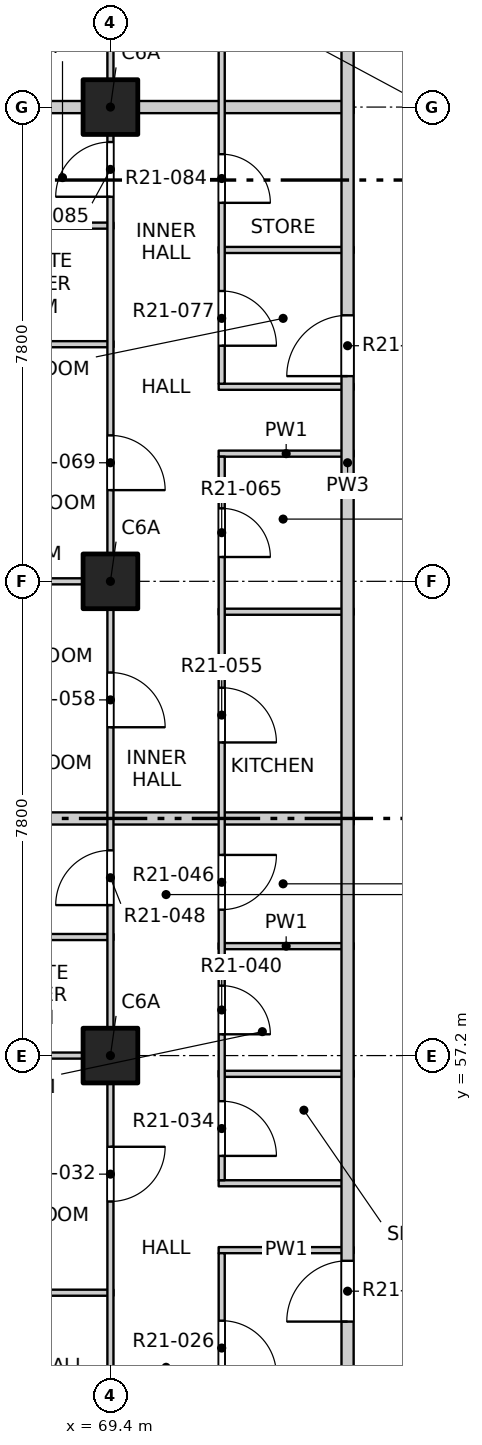
"""IFC4 building model, lengths in metres.
Left out: names, types, materials, properties, quantities, classifications, styles, units other than length and angle.
Written with IfcOpenShell. Run it as: python <this file> out.ifc"""

import sys

from ifc_helpers import new_model, si_unit, direction, frame, frame_2d, origin, origin_2d, place, context, subcontext, project, spatial, rectangle, extrude, element, fill, save


model = new_model("IFC4")
c1 = context("Model", 3, precision=1e-05, world=origin(), true_north=direction((0.0, 1.0)))
c2 = subcontext(c1, "Body", "Model", "MODEL_VIEW")
j1 = project(units=[si_unit("LENGTHUNIT", "METRE"), si_unit("PLANEANGLEUNIT", "RADIAN")], contexts=[c1])
p1 = place(None, origin())
s1 = spatial("IfcSite", under=j1, at=p1, CompositionType="ELEMENT")
p2 = place(p1, origin())
s2 = spatial("IfcBuilding", under=s1, at=p2, CompositionType="ELEMENT")
p3 = place(p2, frame((0.0, 0.0, 221.1)))
s3 = spatial("IfcBuildingStorey", under=s2, at=p3, CompositionType="ELEMENT", Elevation=221.1)
for number, where, z_axis, x_axis in (
    (1, (69.4, 57.2, -0.25), (0.0, 0.0, 1.0), (1.0, 0.0, 0.0)),
    (2, (69.4, 65.0, -0.25), (0.0, 0.0, 1.0), (1.0, 0.0, 0.0)),
    (3, (69.4, 72.8, -0.25), (0.0, 0.0, 1.0), (1.0, 0.0, 0.0)),
):
    element("IfcColumn", number, at=place(p3, frame(where, z_axis=z_axis, x_axis=x_axis)), inside=s3, PredefinedType="COLUMN", context=c2, shape_type="SweptSolid", body=[
        extrude(rectangle(XDim=0.9, YDim=0.9, at=origin_2d()), origin(), (0.0, 0.0, 1.0), 3.4),
    ])
p4 = place(p3, frame((61.9, 53.3, 0.0), z_axis=(0.0, 0.0, 1.0), x_axis=(1.0, 0.0, 0.0)))
e4 = element("IfcWall", 4, at=p4, inside=s3, PredefinedType="PARTITIONING", context=c2, shape_type="SweptSolid", body=[
    extrude(rectangle(XDim=7.55, YDim=0.1, at=frame_2d((3.775, 0.0))), origin(), (0.0, 0.0, 1.0), 3.15),
])
for number, where, z_axis, x_axis in (
    (5, (71.18, 54.0, 0.0), (0.0, 0.0, 1.0), (1.0, 0.0, 0.0)),
    (6, (71.18, 55.1, 0.0), (0.0, 0.0, 1.0), (1.0, 0.0, 0.0)),
    (7, (71.18, 56.9, 0.0), (0.0, 0.0, 1.0), (1.0, 0.0, 0.0)),
):
    element("IfcWall", number, at=place(p3, frame(where, z_axis=z_axis, x_axis=x_axis)), inside=s3, PredefinedType="PARTITIONING", context=c2, shape_type="SweptSolid", body=[
        extrude(rectangle(XDim=2.22, YDim=0.1, at=frame_2d((1.11, 0.0))), origin(), (0.0, 0.0, 1.0), 3.15),
    ])
p5 = place(p3, frame((61.9, 57.2, 0.0), z_axis=(0.0, 0.0, 1.0), x_axis=(1.0, 0.0, 0.0)))
e8 = element("IfcWall", 8, at=p5, inside=s3, PredefinedType="PARTITIONING", context=c2, shape_type="SweptSolid", body=[
    extrude(rectangle(XDim=7.55, YDim=0.1, at=frame_2d((3.775, 0.0))), origin(), (0.0, 0.0, 1.0), 3.15),
])
p6 = place(p3, frame((71.18, 59.0, 0.0), z_axis=(0.0, 0.0, 1.0), x_axis=(1.0, 0.0, 0.0)))
e9 = element("IfcWall", 9, at=p6, inside=s3, PredefinedType="PARTITIONING", context=c2, shape_type="SweptSolid", body=[
    extrude(rectangle(XDim=2.22, YDim=0.1, at=frame_2d((1.11, 0.0))), origin(), (0.0, 0.0, 1.0), 3.15),
])
p7 = place(p3, frame((65.9, 59.15, 0.0), z_axis=(0.0, 0.0, 1.0), x_axis=(1.0, 0.0, 0.0)))
e10 = element("IfcWall", 10, at=p7, inside=s3, PredefinedType="PARTITIONING", context=c2, shape_type="SweptSolid", body=[
    extrude(rectangle(XDim=3.55, YDim=0.1, at=frame_2d((1.775, 0.0))), origin(), (0.0, 0.0, 1.0), 3.15),
])
p8 = place(p3, frame((61.9, 61.1, 0.0), z_axis=(0.0, 0.0, 1.0), x_axis=(1.0, 0.0, 0.0)))
e11 = element("IfcWall", 11, at=p8, inside=s3, PredefinedType="PARTITIONING", context=c2, shape_type="SweptSolid", body=[
    extrude(rectangle(XDim=11.5, YDim=0.2, at=frame_2d((5.75, 0.0))), origin(), (0.0, 0.0, 1.0), 2.55),
])
p9 = place(p3, frame((71.18, 64.5, 0.0), z_axis=(0.0, 0.0, 1.0), x_axis=(1.0, 0.0, 0.0)))
e12 = element("IfcWall", 12, at=p9, inside=s3, PredefinedType="PARTITIONING", context=c2, shape_type="SweptSolid", body=[
    extrude(rectangle(XDim=2.22, YDim=0.1, at=frame_2d((1.11, 0.0))), origin(), (0.0, 0.0, 1.0), 3.15),
])
p10 = place(p3, frame((61.9, 65.0, 0.0), z_axis=(0.0, 0.0, 1.0), x_axis=(1.0, 0.0, 0.0)))
e13 = element("IfcWall", 13, at=p10, inside=s3, PredefinedType="PARTITIONING", context=c2, shape_type="SweptSolid", body=[
    extrude(rectangle(XDim=7.55, YDim=0.1, at=frame_2d((3.775, 0.0))), origin(), (0.0, 0.0, 1.0), 3.15),
])
for number, where, z_axis, x_axis in (
    (14, (71.18, 67.1, 0.0), (0.0, 0.0, 1.0), (1.0, 0.0, 0.0)),
    (15, (71.18, 68.2, 0.0), (0.0, 0.0, 1.0), (1.0, 0.0, 0.0)),
):
    element("IfcWall", number, at=place(p3, frame(where, z_axis=z_axis, x_axis=x_axis)), inside=s3, PredefinedType="PARTITIONING", context=c2, shape_type="SweptSolid", body=[
        extrude(rectangle(XDim=2.22, YDim=0.1, at=frame_2d((1.11, 0.0))), origin(), (0.0, 0.0, 1.0), 3.15),
    ])
p11 = place(p3, frame((61.9, 68.9, 0.0), z_axis=(0.0, 0.0, 1.0), x_axis=(1.0, 0.0, 0.0)))
e16 = element("IfcWall", 16, at=p11, inside=s3, PredefinedType="PARTITIONING", context=c2, shape_type="SweptSolid", body=[
    extrude(rectangle(XDim=7.55, YDim=0.1, at=frame_2d((3.775, 0.0))), origin(), (0.0, 0.0, 1.0), 2.55),
])
p12 = place(p3, frame((71.18, 70.45, 0.0), z_axis=(0.0, 0.0, 1.0), x_axis=(1.0, 0.0, 0.0)))
e17 = element("IfcWall", 17, at=p12, inside=s3, PredefinedType="PARTITIONING", context=c2, shape_type="SweptSolid", body=[
    extrude(rectangle(XDim=2.22, YDim=0.1, at=frame_2d((1.11, 0.0))), origin(), (0.0, 0.0, 1.0), 3.15),
])
p13 = place(p3, frame((66.05, 70.85, 0.0), z_axis=(0.0, 0.0, 1.0), x_axis=(1.0, 0.0, 0.0)))
e18 = element("IfcWall", 18, at=p13, inside=s3, PredefinedType="PARTITIONING", context=c2, shape_type="SweptSolid", body=[
    extrude(rectangle(XDim=3.4, YDim=0.1, at=frame_2d((1.7, 0.0))), origin(), (0.0, 0.0, 1.0), 3.15),
])
p14 = place(p3, frame((61.9, 72.8, 0.0), z_axis=(0.0, 0.0, 1.0), x_axis=(1.0, 0.0, 0.0)))
e19 = element("IfcWall", 19, at=p14, inside=s3, PredefinedType="PARTITIONING", context=c2, shape_type="SweptSolid", body=[
    extrude(rectangle(XDim=11.5, YDim=0.2, at=frame_2d((5.75, 0.0))), origin(), (0.0, 0.0, 1.0), 3.15),
])
p15 = place(p3, frame((69.4, 41.9, 0.0), z_axis=(0.0, 0.0, 1.0), x_axis=(0.0, 1.0, 0.0)))
e20 = element("IfcWall", 20, at=p15, inside=s3, PredefinedType="PARTITIONING", context=c2, shape_type="SweptSolid", body=[
    extrude(rectangle(XDim=46.2, YDim=0.1, at=frame_2d((23.1, 0.0))), origin(), (0.0, 0.0, 1.0), 3.15),
])
p16 = place(p15, frame((1.2, 0.0, 0.0)))
e21 = element("IfcOpeningElement", 21, at=p16, cuts=e20, PredefinedType="OPENING", context=c2, shape_type="SweptSolid", body=[
    extrude(rectangle(XDim=0.9, YDim=2.1, at=frame_2d((0.45, 1.05))), frame((0.0, 0.06, 0.0), z_axis=(0.0, -1.0, 0.0), x_axis=(1.0, 0.0, 0.0)), (0.0, 0.0, 1.0), 0.12),
])
p17 = place(p15, frame((6.025, 0.0, 0.0)))
e22 = element("IfcOpeningElement", 22, at=p17, cuts=e20, PredefinedType="OPENING", context=c2, shape_type="SweptSolid", body=[
    extrude(rectangle(XDim=0.9, YDim=2.1, at=frame_2d((0.45, 1.05))), frame((0.0, 0.06, 0.0), z_axis=(0.0, -1.0, 0.0), x_axis=(1.0, 0.0, 0.0)), (0.0, 0.0, 1.0), 0.12),
])
p18 = place(p15, frame((9.0, 0.0, 0.0)))
e23 = element("IfcOpeningElement", 23, at=p18, cuts=e20, PredefinedType="OPENING", context=c2, shape_type="SweptSolid", body=[
    extrude(rectangle(XDim=0.9, YDim=2.1, at=frame_2d((0.45, 1.05))), frame((0.0, 0.06, 0.0), z_axis=(0.0, -1.0, 0.0), x_axis=(1.0, 0.0, 0.0)), (0.0, 0.0, 1.0), 0.12),
])
p19 = place(p15, frame((12.9, 0.0, 0.0)))
e24 = element("IfcOpeningElement", 24, at=p19, cuts=e20, PredefinedType="OPENING", context=c2, shape_type="SweptSolid", body=[
    extrude(rectangle(XDim=0.9, YDim=2.1, at=frame_2d((0.45, 1.05))), frame((0.0, 0.06, 0.0), z_axis=(0.0, -1.0, 0.0), x_axis=(1.0, 0.0, 0.0)), (0.0, 0.0, 1.0), 0.12),
])
p20 = place(p15, frame((17.775, 0.0, 0.0)))
e25 = element("IfcOpeningElement", 25, at=p20, cuts=e20, PredefinedType="OPENING", context=c2, shape_type="SweptSolid", body=[
    extrude(rectangle(XDim=0.9, YDim=2.1, at=frame_2d((0.45, 1.05))), frame((0.0, 0.06, 0.0), z_axis=(0.0, -1.0, 0.0), x_axis=(1.0, 0.0, 0.0)), (0.0, 0.0, 1.0), 0.12),
])
p21 = place(p15, frame((20.7, 0.0, 0.0)))
e26 = element("IfcOpeningElement", 26, at=p21, cuts=e20, PredefinedType="OPENING", context=c2, shape_type="SweptSolid", body=[
    extrude(rectangle(XDim=0.9, YDim=2.1, at=frame_2d((0.45, 1.05))), frame((0.0, 0.06, 0.0), z_axis=(0.0, -1.0, 0.0), x_axis=(1.0, 0.0, 0.0)), (0.0, 0.0, 1.0), 0.12),
])
p22 = place(p15, frame((24.6, 0.0, 0.0)))
e27 = element("IfcOpeningElement", 27, at=p22, cuts=e20, PredefinedType="OPENING", context=c2, shape_type="SweptSolid", body=[
    extrude(rectangle(XDim=0.9, YDim=2.1, at=frame_2d((0.45, 1.05))), frame((0.0, 0.06, 0.0), z_axis=(0.0, -1.0, 0.0), x_axis=(1.0, 0.0, 0.0)), (0.0, 0.0, 1.0), 0.12),
])
p23 = place(p15, frame((29.425, 0.0, 0.0)))
e28 = element("IfcOpeningElement", 28, at=p23, cuts=e20, PredefinedType="OPENING", context=c2, shape_type="SweptSolid", body=[
    extrude(rectangle(XDim=0.9, YDim=2.1, at=frame_2d((0.45, 1.05))), frame((0.0, 0.06, 0.0), z_axis=(0.0, -1.0, 0.0), x_axis=(1.0, 0.0, 0.0)), (0.0, 0.0, 1.0), 0.12),
])
p24 = place(p15, frame((33.375, 0.0, 0.0)))
e29 = element("IfcOpeningElement", 29, at=p24, cuts=e20, PredefinedType="OPENING", context=c2, shape_type="SweptSolid", body=[
    extrude(rectangle(XDim=0.9, YDim=2.1, at=frame_2d((0.45, 1.05))), frame((0.0, 0.06, 0.0), z_axis=(0.0, -1.0, 0.0), x_axis=(1.0, 0.0, 0.0)), (0.0, 0.0, 1.0), 0.12),
])
p25 = place(p15, frame((36.3, 0.0, 0.0)))
e30 = element("IfcOpeningElement", 30, at=p25, cuts=e20, PredefinedType="OPENING", context=c2, shape_type="SweptSolid", body=[
    extrude(rectangle(XDim=0.9, YDim=2.1, at=frame_2d((0.45, 1.05))), frame((0.0, 0.06, 0.0), z_axis=(0.0, -1.0, 0.0), x_axis=(1.0, 0.0, 0.0)), (0.0, 0.0, 1.0), 0.12),
])
p26 = place(p15, frame((41.175, 0.0, 0.0)))
e31 = element("IfcOpeningElement", 31, at=p26, cuts=e20, PredefinedType="OPENING", context=c2, shape_type="SweptSolid", body=[
    extrude(rectangle(XDim=0.9, YDim=2.1, at=frame_2d((0.45, 1.05))), frame((0.0, 0.06, 0.0), z_axis=(0.0, -1.0, 0.0), x_axis=(1.0, 0.0, 0.0)), (0.0, 0.0, 1.0), 0.12),
])
p27 = place(p15, frame((44.1, 0.0, 0.0)))
e32 = element("IfcOpeningElement", 32, at=p27, cuts=e20, PredefinedType="OPENING", context=c2, shape_type="SweptSolid", body=[
    extrude(rectangle(XDim=0.9, YDim=2.1, at=frame_2d((0.45, 1.05))), frame((0.0, 0.06, 0.0), z_axis=(0.0, -1.0, 0.0), x_axis=(1.0, 0.0, 0.0)), (0.0, 0.0, 1.0), 0.12),
])
p28 = place(p3, frame((71.23, 45.55, 0.0), z_axis=(0.0, 0.0, 1.0), x_axis=(0.0, 1.0, 0.0)))
e33 = element("IfcWall", 33, at=p28, inside=s3, PredefinedType="PARTITIONING", context=c2, shape_type="SweptSolid", body=[
    extrude(rectangle(XDim=8.4, YDim=0.1, at=frame_2d((4.2, 0.0))), origin(), (0.0, 0.0, 1.0), 3.15),
])
p29 = place(p28, frame((0.85, 0.0, 0.0)))
e34 = element("IfcOpeningElement", 34, at=p29, cuts=e33, PredefinedType="OPENING", context=c2, shape_type="SweptSolid", body=[
    extrude(rectangle(XDim=0.8, YDim=2.1, at=frame_2d((0.4, 1.05))), frame((0.0, 0.06, 0.0), z_axis=(0.0, -1.0, 0.0), x_axis=(1.0, 0.0, 0.0)), (0.0, 0.0, 1.0), 0.12),
])
p30 = place(p28, frame((3.49, 0.0, 0.0)))
e35 = element("IfcOpeningElement", 35, at=p30, cuts=e33, PredefinedType="OPENING", context=c2, shape_type="SweptSolid", body=[
    extrude(rectangle(XDim=0.8, YDim=2.1, at=frame_2d((0.4, 1.05))), frame((0.0, 0.06, 0.0), z_axis=(0.0, -1.0, 0.0), x_axis=(1.0, 0.0, 0.0)), (0.0, 0.0, 1.0), 0.12),
])
p31 = place(p28, frame((6.39, 0.0, 0.0)))
e36 = element("IfcOpeningElement", 36, at=p31, cuts=e33, PredefinedType="OPENING", context=c2, shape_type="SweptSolid", body=[
    extrude(rectangle(XDim=0.9, YDim=2.1, at=frame_2d((0.45, 1.05))), frame((0.0, 0.06, 0.0), z_axis=(0.0, -1.0, 0.0), x_axis=(1.0, 0.0, 0.0)), (0.0, 0.0, 1.0), 0.12),
])
p32 = place(p3, frame((71.23, 55.15, 0.0), z_axis=(0.0, 0.0, 1.0), x_axis=(0.0, 1.0, 0.0)))
e37 = element("IfcWall", 37, at=p32, inside=s3, PredefinedType="PARTITIONING", context=c2, shape_type="SweptSolid", body=[
    extrude(rectangle(XDim=11.9, YDim=0.1, at=frame_2d((5.95, 0.0))), origin(), (0.0, 0.0, 1.0), 3.15),
])
p33 = place(p32, frame((0.4, 0.0, 0.0)))
e38 = element("IfcOpeningElement", 38, at=p33, cuts=e37, PredefinedType="OPENING", context=c2, shape_type="SweptSolid", body=[
    extrude(rectangle(XDim=0.9, YDim=2.1, at=frame_2d((0.45, 1.05))), frame((0.0, 0.06, 0.0), z_axis=(0.0, -1.0, 0.0), x_axis=(1.0, 0.0, 0.0)), (0.0, 0.0, 1.0), 0.12),
])
p34 = place(p32, frame((2.4, 0.0, 0.0)))
e39 = element("IfcOpeningElement", 39, at=p34, cuts=e37, PredefinedType="OPENING", context=c2, shape_type="SweptSolid", body=[
    extrude(rectangle(XDim=0.8, YDim=2.1, at=frame_2d((0.4, 1.05))), frame((0.0, 0.06, 0.0), z_axis=(0.0, -1.0, 0.0), x_axis=(1.0, 0.0, 0.0)), (0.0, 0.0, 1.0), 0.12),
])
p35 = place(p32, frame((4.45, 0.0, 0.0)))
e40 = element("IfcOpeningElement", 40, at=p35, cuts=e37, PredefinedType="OPENING", context=c2, shape_type="SweptSolid", body=[
    extrude(rectangle(XDim=0.9, YDim=2.1, at=frame_2d((0.45, 1.05))), frame((0.0, 0.06, 0.0), z_axis=(0.0, -1.0, 0.0), x_axis=(1.0, 0.0, 0.0)), (0.0, 0.0, 1.0), 0.12),
])
p36 = place(p32, frame((7.2, 0.0, 0.0)))
e41 = element("IfcOpeningElement", 41, at=p36, cuts=e37, PredefinedType="OPENING", context=c2, shape_type="SweptSolid", body=[
    extrude(rectangle(XDim=0.9, YDim=2.1, at=frame_2d((0.45, 1.05))), frame((0.0, 0.06, 0.0), z_axis=(0.0, -1.0, 0.0), x_axis=(1.0, 0.0, 0.0)), (0.0, 0.0, 1.0), 0.12),
])
p37 = place(p32, frame((10.25, 0.0, 0.0)))
e42 = element("IfcOpeningElement", 42, at=p37, cuts=e37, PredefinedType="OPENING", context=c2, shape_type="SweptSolid", body=[
    extrude(rectangle(XDim=0.8, YDim=2.1, at=frame_2d((0.4, 1.05))), frame((0.0, 0.06, 0.0), z_axis=(0.0, -1.0, 0.0), x_axis=(1.0, 0.0, 0.0)), (0.0, 0.0, 1.0), 0.12),
])
p38 = place(p3, frame((71.23, 68.25, 0.0), z_axis=(0.0, 0.0, 1.0), x_axis=(0.0, 1.0, 0.0)))
e43 = element("IfcWall", 43, at=p38, inside=s3, PredefinedType="PARTITIONING", context=c2, shape_type="SweptSolid", body=[
    extrude(rectangle(XDim=9.25, YDim=0.1, at=frame_2d((4.625, 0.0))), origin(), (0.0, 0.0, 1.0), 3.15),
])
p39 = place(p38, frame((0.625, 0.0, 0.0)))
e44 = element("IfcOpeningElement", 44, at=p39, cuts=e43, PredefinedType="OPENING", context=c2, shape_type="SweptSolid", body=[
    extrude(rectangle(XDim=0.9, YDim=2.1, at=frame_2d((0.45, 1.05))), frame((0.0, 0.06, 0.0), z_axis=(0.0, -1.0, 0.0), x_axis=(1.0, 0.0, 0.0)), (0.0, 0.0, 1.0), 0.12),
])
p40 = place(p38, frame((2.975, 0.0, 0.0)))
e45 = element("IfcOpeningElement", 45, at=p40, cuts=e43, PredefinedType="OPENING", context=c2, shape_type="SweptSolid", body=[
    extrude(rectangle(XDim=0.8, YDim=2.1, at=frame_2d((0.4, 1.05))), frame((0.0, 0.06, 0.0), z_axis=(0.0, -1.0, 0.0), x_axis=(1.0, 0.0, 0.0)), (0.0, 0.0, 1.0), 0.12),
])
p41 = place(p38, frame((5.625, 0.0, 0.0)))
e46 = element("IfcOpeningElement", 46, at=p41, cuts=e43, PredefinedType="OPENING", context=c2, shape_type="SweptSolid", body=[
    extrude(rectangle(XDim=0.8, YDim=2.1, at=frame_2d((0.4, 1.05))), frame((0.0, 0.06, 0.0), z_axis=(0.0, -1.0, 0.0), x_axis=(1.0, 0.0, 0.0)), (0.0, 0.0, 1.0), 0.12),
])
p42 = place(p38, frame((7.95, 0.0, 0.0)))
e47 = element("IfcOpeningElement", 47, at=p42, cuts=e43, PredefinedType="OPENING", context=c2, shape_type="SweptSolid", body=[
    extrude(rectangle(XDim=0.9, YDim=2.1, at=frame_2d((0.45, 1.05))), frame((0.0, 0.06, 0.0), z_axis=(0.0, -1.0, 0.0), x_axis=(1.0, 0.0, 0.0)), (0.0, 0.0, 1.0), 0.12),
])
p43 = place(p3, frame((73.3, 49.5, 0.0), z_axis=(0.0, 0.0, 1.0), x_axis=(0.0, 1.0, 0.0)))
e48 = element("IfcWall", 48, at=p43, inside=s3, PredefinedType="PARTITIONING", context=c2, shape_type="SweptSolid", body=[
    extrude(rectangle(XDim=34.9, YDim=0.2, at=frame_2d((17.45, 0.0))), origin(), (0.0, 0.0, 1.0), 3.15),
])
p44 = place(p43, frame((3.325, 0.0, 0.0)))
e49 = element("IfcOpeningElement", 49, at=p44, cuts=e48, PredefinedType="OPENING", context=c2, shape_type="SweptSolid", body=[
    extrude(rectangle(XDim=1.0, YDim=2.1, at=frame_2d((0.5, 1.05))), frame((0.0, 0.11, 0.0), z_axis=(0.0, -1.0, 0.0), x_axis=(1.0, 0.0, 0.0)), (0.0, 0.0, 1.0), 0.22),
])
p45 = place(p43, frame((18.875, 0.0, 0.0)))
e50 = element("IfcOpeningElement", 50, at=p45, cuts=e48, PredefinedType="OPENING", context=c2, shape_type="SweptSolid", body=[
    extrude(rectangle(XDim=1.0, YDim=2.1, at=frame_2d((0.5, 1.05))), frame((0.0, 0.11, 0.0), z_axis=(0.0, -1.0, 0.0), x_axis=(1.0, 0.0, 0.0)), (0.0, 0.0, 1.0), 0.22),
])
p46 = place(p43, frame((29.325, 0.0, 0.0)))
e51 = element("IfcOpeningElement", 51, at=p46, cuts=e48, PredefinedType="OPENING", context=c2, shape_type="SweptSolid", body=[
    extrude(rectangle(XDim=1.0, YDim=2.1, at=frame_2d((0.5, 1.05))), frame((0.0, 0.11, 0.0), z_axis=(0.0, -1.0, 0.0), x_axis=(1.0, 0.0, 0.0)), (0.0, 0.0, 1.0), 0.22),
])
p47 = place(p31, origin())
e52 = element("IfcDoor", 52, at=p47, inside=s3, OperationType="SINGLE_SWING_RIGHT", PredefinedType="DOOR", context=c2, shape_type="SweptSolid", body=[
    extrude(rectangle(XDim=0.9, YDim=2.1, at=frame_2d((0.45, 1.05))), frame((0.0, 0.025, 0.0), z_axis=(0.0, -1.0, 0.0), x_axis=(1.0, 0.0, 0.0)), (0.0, 0.0, 1.0), 0.05),
])
fill(e36, e52)
p48 = place(p44, origin())
e53 = element("IfcDoor", 53, at=p48, inside=s3, OperationType="SINGLE_SWING_LEFT", PredefinedType="DOOR", context=c2, shape_type="SweptSolid", body=[
    extrude(rectangle(XDim=1.0, YDim=2.1, at=frame_2d((0.5, 1.05))), frame((0.0, 0.025, 0.0), z_axis=(0.0, -1.0, 0.0), x_axis=(1.0, 0.0, 0.0)), (0.0, 0.0, 1.0), 0.05),
])
fill(e49, e53)
p49 = place(p19, origin())
e54 = element("IfcDoor", 54, at=p49, inside=s3, OperationType="SINGLE_SWING_LEFT", PredefinedType="DOOR", context=c2, shape_type="SweptSolid", body=[
    extrude(rectangle(XDim=0.9, YDim=2.1, at=frame_2d((0.45, 1.05))), frame((0.0, 0.025, 0.0), z_axis=(0.0, -1.0, 0.0), x_axis=(1.0, 0.0, 0.0)), (0.0, 0.0, 1.0), 0.05),
])
fill(e24, e54)
p50 = place(p33, origin())
e55 = element("IfcDoor", 55, at=p50, inside=s3, OperationType="SINGLE_SWING_RIGHT", PredefinedType="DOOR", context=c2, shape_type="SweptSolid", body=[
    extrude(rectangle(XDim=0.9, YDim=2.1, at=frame_2d((0.45, 1.05))), frame((0.0, 0.025, 0.0), z_axis=(0.0, -1.0, 0.0), x_axis=(1.0, 0.0, 0.0)), (0.0, 0.0, 1.0), 0.05),
])
fill(e38, e55)
p51 = place(p34, origin())
e56 = element("IfcDoor", 56, at=p51, inside=s3, OperationType="SINGLE_SWING_RIGHT", PredefinedType="DOOR", context=c2, shape_type="SweptSolid", body=[
    extrude(rectangle(XDim=0.8, YDim=2.1, at=frame_2d((0.4, 1.05))), frame((0.0, 0.025, 0.0), z_axis=(0.0, -1.0, 0.0), x_axis=(1.0, 0.0, 0.0)), (0.0, 0.0, 1.0), 0.05),
])
fill(e39, e56)
p52 = place(p35, origin())
e57 = element("IfcDoor", 57, at=p52, inside=s3, OperationType="SINGLE_SWING_LEFT", PredefinedType="DOOR", context=c2, shape_type="SweptSolid", body=[
    extrude(rectangle(XDim=0.9, YDim=2.1, at=frame_2d((0.45, 1.05))), frame((0.0, 0.025, 0.0), z_axis=(0.0, -1.0, 0.0), x_axis=(1.0, 0.0, 0.0)), (0.0, 0.0, 1.0), 0.05),
])
fill(e40, e57)
p53 = place(p20, origin())
e58 = element("IfcDoor", 58, at=p53, inside=s3, OperationType="SINGLE_SWING_LEFT", PredefinedType="DOOR", context=c2, shape_type="SweptSolid", body=[
    extrude(rectangle(XDim=0.9, YDim=2.1, at=frame_2d((0.45, 1.05))), frame((0.0, 0.025, 0.0), z_axis=(0.0, -1.0, 0.0), x_axis=(1.0, 0.0, 0.0)), (0.0, 0.0, 1.0), 0.05),
])
fill(e25, e58)
p54 = place(p36, origin())
e59 = element("IfcDoor", 59, at=p54, inside=s3, OperationType="SINGLE_SWING_RIGHT", PredefinedType="DOOR", context=c2, shape_type="SweptSolid", body=[
    extrude(rectangle(XDim=0.9, YDim=2.1, at=frame_2d((0.45, 1.05))), frame((0.0, 0.025, 0.0), z_axis=(0.0, -1.0, 0.0), x_axis=(1.0, 0.0, 0.0)), (0.0, 0.0, 1.0), 0.05),
])
fill(e41, e59)
p55 = place(p21, origin())
e60 = element("IfcDoor", 60, at=p55, inside=s3, OperationType="SINGLE_SWING_RIGHT", PredefinedType="DOOR", context=c2, shape_type="SweptSolid", body=[
    extrude(rectangle(XDim=0.9, YDim=2.1, at=frame_2d((0.45, 1.05))), frame((0.0, 0.025, 0.0), z_axis=(0.0, -1.0, 0.0), x_axis=(1.0, 0.0, 0.0)), (0.0, 0.0, 1.0), 0.05),
])
fill(e26, e60)
p56 = place(p37, origin())
e61 = element("IfcDoor", 61, at=p56, inside=s3, OperationType="SINGLE_SWING_RIGHT", PredefinedType="DOOR", context=c2, shape_type="SweptSolid", body=[
    extrude(rectangle(XDim=0.8, YDim=2.1, at=frame_2d((0.4, 1.05))), frame((0.0, 0.025, 0.0), z_axis=(0.0, -1.0, 0.0), x_axis=(1.0, 0.0, 0.0)), (0.0, 0.0, 1.0), 0.05),
])
fill(e42, e61)
p57 = place(p22, origin())
e62 = element("IfcDoor", 62, at=p57, inside=s3, OperationType="SINGLE_SWING_RIGHT", PredefinedType="DOOR", context=c2, shape_type="SweptSolid", body=[
    extrude(rectangle(XDim=0.9, YDim=2.1, at=frame_2d((0.45, 1.05))), frame((0.0, 0.025, 0.0), z_axis=(0.0, -1.0, 0.0), x_axis=(1.0, 0.0, 0.0)), (0.0, 0.0, 1.0), 0.05),
])
fill(e27, e62)
p58 = place(p45, origin())
e63 = element("IfcDoor", 63, at=p58, inside=s3, OperationType="SINGLE_SWING_RIGHT", PredefinedType="DOOR", context=c2, shape_type="SweptSolid", body=[
    extrude(rectangle(XDim=1.0, YDim=2.1, at=frame_2d((0.5, 1.05))), frame((0.0, 0.025, 0.0), z_axis=(0.0, -1.0, 0.0), x_axis=(1.0, 0.0, 0.0)), (0.0, 0.0, 1.0), 0.05),
])
fill(e50, e63)
p59 = place(p39, origin())
e64 = element("IfcDoor", 64, at=p59, inside=s3, OperationType="SINGLE_SWING_RIGHT", PredefinedType="DOOR", context=c2, shape_type="SweptSolid", body=[
    extrude(rectangle(XDim=0.9, YDim=2.1, at=frame_2d((0.45, 1.05))), frame((0.0, 0.025, 0.0), z_axis=(0.0, -1.0, 0.0), x_axis=(1.0, 0.0, 0.0)), (0.0, 0.0, 1.0), 0.05),
])
fill(e44, e64)
p60 = place(p40, origin())
e65 = element("IfcDoor", 65, at=p60, inside=s3, OperationType="SINGLE_SWING_RIGHT", PredefinedType="DOOR", context=c2, shape_type="SweptSolid", body=[
    extrude(rectangle(XDim=0.8, YDim=2.1, at=frame_2d((0.4, 1.05))), frame((0.0, 0.025, 0.0), z_axis=(0.0, -1.0, 0.0), x_axis=(1.0, 0.0, 0.0)), (0.0, 0.0, 1.0), 0.05),
])
fill(e45, e65)
p61 = place(p23, origin())
e66 = element("IfcDoor", 66, at=p61, inside=s3, OperationType="SINGLE_SWING_LEFT", PredefinedType="DOOR", context=c2, shape_type="SweptSolid", body=[
    extrude(rectangle(XDim=0.9, YDim=2.1, at=frame_2d((0.45, 1.05))), frame((0.0, 0.025, 0.0), z_axis=(0.0, -1.0, 0.0), x_axis=(1.0, 0.0, 0.0)), (0.0, 0.0, 1.0), 0.05),
])
fill(e28, e66)
save(model, sys.argv[1])
